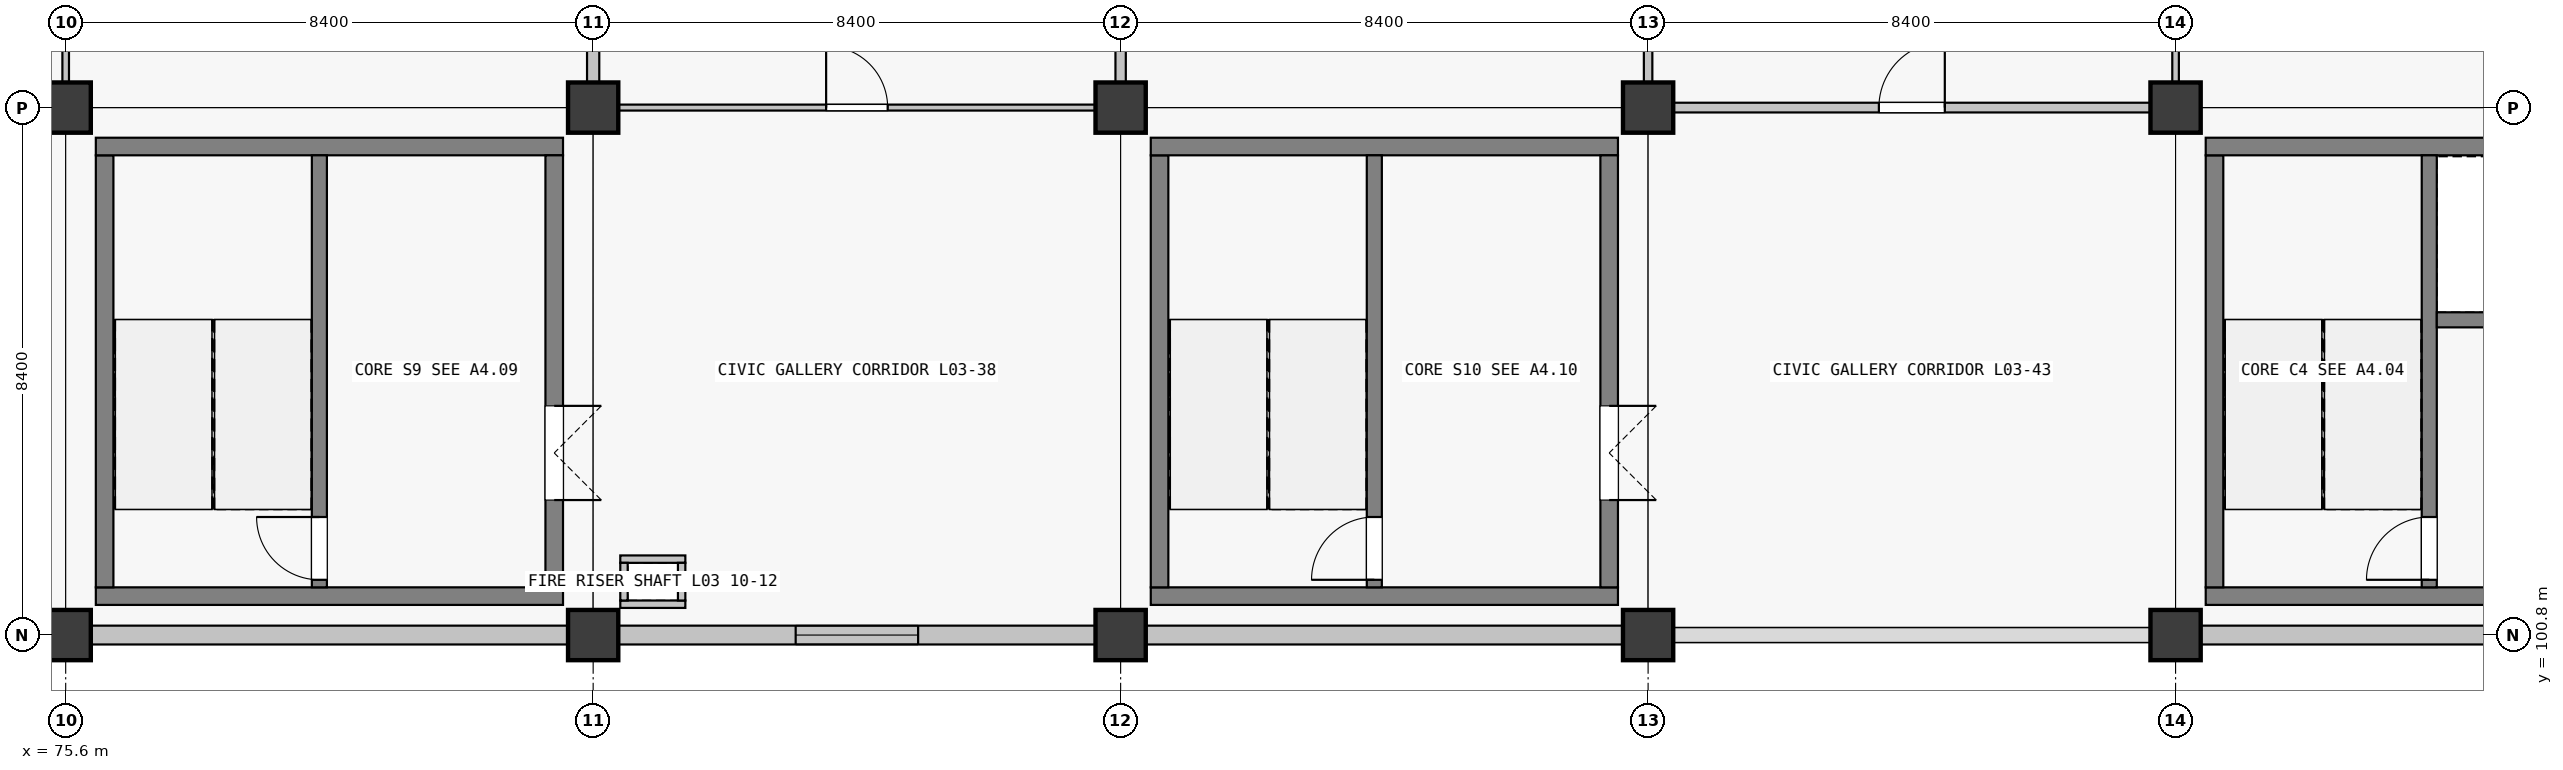
"""IFC4 building model, lengths in metres.
Left out: names, types, materials, properties, quantities, classifications, styles, units other than length and angle.
Written with IfcOpenShell. Run it as: python <this file> out.ifc"""

import sys

from ifc_helpers import new_model, si_unit, direction, frame, frame_2d, origin, origin_2d, place, context, subcontext, project, spatial, rectangle, extrude, element, fill, save


model = new_model("IFC4")
c1 = context("Model", 3, precision=1e-05, world=origin(), true_north=direction((0.0, 1.0)))
c2 = subcontext(c1, "Body", "Model", "MODEL_VIEW")
j1 = project(units=[si_unit("LENGTHUNIT", "METRE"), si_unit("PLANEANGLEUNIT", "RADIAN")], contexts=[c1])
p1 = place(None, origin())
s1 = spatial("IfcSite", under=j1, at=p1, CompositionType="ELEMENT")
p2 = place(p1, origin())
s2 = spatial("IfcBuilding", under=s1, at=p2, CompositionType="ELEMENT")
p3 = place(p2, frame((0.0, 0.0, 14.76)))
s3 = spatial("IfcBuildingStorey", under=s2, at=p3, CompositionType="ELEMENT", Elevation=14.76)
for number, where, z_axis, x_axis in (
    (1, (75.6, 100.8, 0.0), (0.0, 0.0, 1.0), (1.0, 0.0, 0.0)),
    (2, (75.6, 109.2, 0.0), (0.0, 0.0, 1.0), (1.0, 0.0, 0.0)),
    (3, (84.0, 100.8, 0.0), (0.0, 0.0, 1.0), (1.0, 0.0, 0.0)),
    (4, (84.0, 109.2, 0.0), (0.0, 0.0, 1.0), (1.0, 0.0, 0.0)),
    (5, (92.4, 100.8, 0.0), (0.0, 0.0, 1.0), (1.0, 0.0, 0.0)),
    (6, (92.4, 109.2, 0.0), (0.0, 0.0, 1.0), (1.0, 0.0, 0.0)),
    (7, (100.8, 100.8, 0.0), (0.0, 0.0, 1.0), (1.0, 0.0, 0.0)),
    (8, (100.8, 109.2, 0.0), (0.0, 0.0, 1.0), (1.0, 0.0, 0.0)),
    (9, (109.2, 100.8, 0.0), (0.0, 0.0, 1.0), (1.0, 0.0, 0.0)),
    (10, (109.2, 109.2, 0.0), (0.0, 0.0, 1.0), (1.0, 0.0, 0.0)),
):
    element("IfcColumn", number, at=place(p3, frame(where, z_axis=z_axis, x_axis=x_axis)), inside=s3, PredefinedType="COLUMN", context=c2, shape_type="SweptSolid", body=[
        extrude(rectangle(XDim=0.8, YDim=0.8, at=origin_2d()), origin(), (0.0, 0.0, 1.0), 4.32),
    ])
p4 = place(p3, frame((83.599, 100.8, 0.0), z_axis=(0.0, 0.0, 1.0), x_axis=(-1.0, 0.0, 0.0)))
e11 = element("IfcWall", 11, at=p4, inside=s3, PredefinedType="SOLIDWALL", context=c2, shape_type="SweptSolid", body=[
    extrude(rectangle(XDim=7.598, YDim=0.3, at=frame_2d((3.799, 0.0))), origin(), (0.0, 0.0, 1.0), 3.37),
])
p5 = place(p3, frame((91.999, 100.8, 0.0), z_axis=(0.0, 0.0, 1.0), x_axis=(-1.0, 0.0, 0.0)))
e12 = element("IfcWall", 12, at=p5, inside=s3, PredefinedType="SOLIDWALL", context=c2, shape_type="SweptSolid", body=[
    extrude(rectangle(XDim=7.598, YDim=0.3, at=frame_2d((3.799, 0.0))), origin(), (0.0, 0.0, 1.0), 3.37),
])
p6 = place(p5, frame((2.824, 0.0, 0.9)))
e13 = element("IfcOpeningElement", 13, at=p6, cuts=e12, PredefinedType="OPENING", context=c2, shape_type="SweptSolid", body=[
    extrude(rectangle(XDim=1.95, YDim=1.6, at=frame_2d((0.975, 0.8))), frame((0.0, 0.15, 0.0), z_axis=(0.0, -1.0, 0.0), x_axis=(1.0, 0.0, 0.0)), (0.0, 0.0, 1.0), 0.3),
])
for number, where, z_axis, x_axis in (
    (14, (100.399, 100.8, 0.0), (0.0, 0.0, 1.0), (-1.0, 0.0, 0.0)),
    (15, (117.199, 100.8, 0.0), (0.0, 0.0, 1.0), (-1.0, 0.0, 0.0)),
):
    element("IfcWall", number, at=place(p3, frame(where, z_axis=z_axis, x_axis=x_axis)), inside=s3, PredefinedType="SOLIDWALL", context=c2, shape_type="SweptSolid", body=[
        extrude(rectangle(XDim=7.598, YDim=0.3, at=frame_2d((3.799, 0.0))), origin(), (0.0, 0.0, 1.0), 3.37),
    ])
p7 = place(p3, frame((117.12, 101.42, 0.0), z_axis=(0.0, 0.0, 1.0), x_axis=(-1.0, 0.0, 0.0)))
e16 = element("IfcWall", 16, at=p7, inside=s3, PredefinedType="SHEAR", context=c2, shape_type="SweptSolid", body=[
    extrude(rectangle(XDim=7.44, YDim=0.28, at=frame_2d((3.72, 0.0))), origin(), (0.0, 0.0, 1.0), 4.32),
])
p8 = place(p3, frame((109.82, 101.56, 0.0), z_axis=(0.0, 0.0, 1.0), x_axis=(0.0, 1.0, 0.0)))
e17 = element("IfcWall", 17, at=p8, inside=s3, PredefinedType="SHEAR", context=c2, shape_type="SweptSolid", body=[
    extrude(rectangle(XDim=6.88, YDim=0.28, at=frame_2d((3.44, 0.0))), origin(), (0.0, 0.0, 1.0), 4.32),
])
p9 = place(p3, frame((109.68, 108.58, 0.0), z_axis=(0.0, 0.0, 1.0), x_axis=(1.0, 0.0, 0.0)))
e18 = element("IfcWall", 18, at=p9, inside=s3, PredefinedType="SHEAR", context=c2, shape_type="SweptSolid", body=[
    extrude(rectangle(XDim=7.44, YDim=0.28, at=frame_2d((3.72, 0.0))), origin(), (0.0, 0.0, 1.0), 4.32),
])
p10 = place(p3, frame((113.24, 101.56, 0.0), z_axis=(0.0, 0.0, 1.0), x_axis=(0.0, 1.0, 0.0)))
e19 = element("IfcWall", 19, at=p10, inside=s3, PredefinedType="SHEAR", context=c2, shape_type="SweptSolid", body=[
    extrude(rectangle(XDim=6.88, YDim=0.24, at=frame_2d((3.44, 0.0))), origin(), (0.0, 0.0, 1.0), 4.32),
])
p11 = place(p10, frame((0.12, 0.0, 0.0)))
e20 = element("IfcOpeningElement", 20, at=p11, cuts=e19, PredefinedType="OPENING", context=c2, shape_type="SweptSolid", body=[
    extrude(rectangle(XDim=1.0, YDim=2.15, at=frame_2d((0.5, 1.075))), frame((0.0, 0.12, 0.0), z_axis=(0.0, -1.0, 0.0), x_axis=(1.0, 0.0, 0.0)), (0.0, 0.0, 1.0), 0.24),
])
p12 = place(p3, frame((113.36, 105.82, 0.0), z_axis=(0.0, 0.0, 1.0), x_axis=(1.0, 0.0, 0.0)))
e21 = element("IfcWall", 21, at=p12, inside=s3, PredefinedType="SHEAR", context=c2, shape_type="SweptSolid", body=[
    extrude(rectangle(XDim=3.48, YDim=0.24, at=frame_2d((1.74, 0.0))), origin(), (0.0, 0.0, 1.0), 4.32),
])
p13 = place(p12, frame((1.14, 0.0, 0.0)))
e22 = element("IfcOpeningElement", 22, at=p13, cuts=e21, PredefinedType="OPENING", context=c2, shape_type="SweptSolid", body=[
    extrude(rectangle(XDim=1.2, YDim=2.2, at=frame_2d((0.6, 1.1))), frame((0.0, 0.12, 0.0), z_axis=(0.0, -1.0, 0.0), x_axis=(1.0, 0.0, 0.0)), (0.0, 0.0, 1.0), 0.24),
])
p14 = place(p3, frame((83.52, 101.42, 0.0), z_axis=(0.0, 0.0, 1.0), x_axis=(-1.0, 0.0, 0.0)))
e23 = element("IfcWall", 23, at=p14, inside=s3, PredefinedType="SHEAR", context=c2, shape_type="SweptSolid", body=[
    extrude(rectangle(XDim=7.44, YDim=0.28, at=frame_2d((3.72, 0.0))), origin(), (0.0, 0.0, 1.0), 4.32),
])
p15 = place(p3, frame((76.22, 101.56, 0.0), z_axis=(0.0, 0.0, 1.0), x_axis=(0.0, 1.0, 0.0)))
e24 = element("IfcWall", 24, at=p15, inside=s3, PredefinedType="SHEAR", context=c2, shape_type="SweptSolid", body=[
    extrude(rectangle(XDim=6.88, YDim=0.28, at=frame_2d((3.44, 0.0))), origin(), (0.0, 0.0, 1.0), 4.32),
])
p16 = place(p3, frame((76.08, 108.58, 0.0), z_axis=(0.0, 0.0, 1.0), x_axis=(1.0, 0.0, 0.0)))
e25 = element("IfcWall", 25, at=p16, inside=s3, PredefinedType="SHEAR", context=c2, shape_type="SweptSolid", body=[
    extrude(rectangle(XDim=7.44, YDim=0.28, at=frame_2d((3.72, 0.0))), origin(), (0.0, 0.0, 1.0), 4.32),
])
p17 = place(p3, frame((83.38, 108.44, 0.0), z_axis=(0.0, 0.0, 1.0), x_axis=(0.0, -1.0, 0.0)))
e26 = element("IfcWall", 26, at=p17, inside=s3, PredefinedType="SHEAR", context=c2, shape_type="SweptSolid", body=[
    extrude(rectangle(XDim=6.88, YDim=0.28, at=frame_2d((3.44, 0.0))), origin(), (0.0, 0.0, 1.0), 4.32),
])
p18 = place(p17, frame((3.99, 0.0, 0.0)))
e27 = element("IfcOpeningElement", 27, at=p18, cuts=e26, PredefinedType="OPENING", context=c2, shape_type="SweptSolid", body=[
    extrude(rectangle(XDim=1.5, YDim=2.15, at=frame_2d((0.75, 1.075))), frame((0.0, 0.14, 0.0), z_axis=(0.0, -1.0, 0.0), x_axis=(1.0, 0.0, 0.0)), (0.0, 0.0, 1.0), 0.28),
])
p19 = place(p3, frame((79.64, 101.56, 0.0), z_axis=(0.0, 0.0, 1.0), x_axis=(0.0, 1.0, 0.0)))
e28 = element("IfcWall", 28, at=p19, inside=s3, PredefinedType="SHEAR", context=c2, shape_type="SweptSolid", body=[
    extrude(rectangle(XDim=6.88, YDim=0.24, at=frame_2d((3.44, 0.0))), origin(), (0.0, 0.0, 1.0), 4.32),
])
p20 = place(p19, frame((0.12, 0.0, 0.0)))
e29 = element("IfcOpeningElement", 29, at=p20, cuts=e28, PredefinedType="OPENING", context=c2, shape_type="SweptSolid", body=[
    extrude(rectangle(XDim=1.0, YDim=2.15, at=frame_2d((0.5, 1.075))), frame((0.0, 0.12, 0.0), z_axis=(0.0, -1.0, 0.0), x_axis=(1.0, 0.0, 0.0)), (0.0, 0.0, 1.0), 0.24),
])
p21 = place(p3, frame((100.32, 101.42, 0.0), z_axis=(0.0, 0.0, 1.0), x_axis=(-1.0, 0.0, 0.0)))
e30 = element("IfcWall", 30, at=p21, inside=s3, PredefinedType="SHEAR", context=c2, shape_type="SweptSolid", body=[
    extrude(rectangle(XDim=7.44, YDim=0.28, at=frame_2d((3.72, 0.0))), origin(), (0.0, 0.0, 1.0), 4.32),
])
p22 = place(p3, frame((93.02, 101.56, 0.0), z_axis=(0.0, 0.0, 1.0), x_axis=(0.0, 1.0, 0.0)))
e31 = element("IfcWall", 31, at=p22, inside=s3, PredefinedType="SHEAR", context=c2, shape_type="SweptSolid", body=[
    extrude(rectangle(XDim=6.88, YDim=0.28, at=frame_2d((3.44, 0.0))), origin(), (0.0, 0.0, 1.0), 4.32),
])
p23 = place(p3, frame((92.88, 108.58, 0.0), z_axis=(0.0, 0.0, 1.0), x_axis=(1.0, 0.0, 0.0)))
e32 = element("IfcWall", 32, at=p23, inside=s3, PredefinedType="SHEAR", context=c2, shape_type="SweptSolid", body=[
    extrude(rectangle(XDim=7.44, YDim=0.28, at=frame_2d((3.72, 0.0))), origin(), (0.0, 0.0, 1.0), 4.32),
])
p24 = place(p3, frame((100.18, 108.44, 0.0), z_axis=(0.0, 0.0, 1.0), x_axis=(0.0, -1.0, 0.0)))
e33 = element("IfcWall", 33, at=p24, inside=s3, PredefinedType="SHEAR", context=c2, shape_type="SweptSolid", body=[
    extrude(rectangle(XDim=6.88, YDim=0.28, at=frame_2d((3.44, 0.0))), origin(), (0.0, 0.0, 1.0), 4.32),
])
p25 = place(p24, frame((3.99, 0.0, 0.0)))
e34 = element("IfcOpeningElement", 34, at=p25, cuts=e33, PredefinedType="OPENING", context=c2, shape_type="SweptSolid", body=[
    extrude(rectangle(XDim=1.5, YDim=2.15, at=frame_2d((0.75, 1.075))), frame((0.0, 0.14, 0.0), z_axis=(0.0, -1.0, 0.0), x_axis=(1.0, 0.0, 0.0)), (0.0, 0.0, 1.0), 0.28),
])
p26 = place(p3, frame((96.44, 101.56, 0.0), z_axis=(0.0, 0.0, 1.0), x_axis=(0.0, 1.0, 0.0)))
e35 = element("IfcWall", 35, at=p26, inside=s3, PredefinedType="SHEAR", context=c2, shape_type="SweptSolid", body=[
    extrude(rectangle(XDim=6.88, YDim=0.24, at=frame_2d((3.44, 0.0))), origin(), (0.0, 0.0, 1.0), 4.32),
])
p27 = place(p26, frame((0.12, 0.0, 0.0)))
e36 = element("IfcOpeningElement", 36, at=p27, cuts=e35, PredefinedType="OPENING", context=c2, shape_type="SweptSolid", body=[
    extrude(rectangle(XDim=1.0, YDim=2.15, at=frame_2d((0.5, 1.075))), frame((0.0, 0.12, 0.0), z_axis=(0.0, -1.0, 0.0), x_axis=(1.0, 0.0, 0.0)), (0.0, 0.0, 1.0), 0.24),
])
for number, where, z_axis, x_axis in (
    (37, (84.432, 101.291, 0.0), (0.0, 0.0, 1.0), (1.0, 0.0, 0.0)),
    (38, (84.432, 102.009, 0.0), (0.0, 0.0, 1.0), (1.0, 0.0, 0.0)),
):
    element("IfcWall", number, at=place(p3, frame(where, z_axis=z_axis, x_axis=x_axis)), inside=s3, PredefinedType="PARTITIONING", context=c2, shape_type="SweptSolid", body=[
        extrude(rectangle(XDim=1.036, YDim=0.118, at=frame_2d((0.518, 0.0))), origin(), (0.0, 0.0, 1.0), 3.35),
    ])
for number, where, z_axis, x_axis in (
    (39, (84.491, 101.35, 0.0), (0.0, 0.0, 1.0), (0.0, 1.0, 0.0)),
    (40, (85.409, 101.35, 0.0), (0.0, 0.0, 1.0), (0.0, 1.0, 0.0)),
):
    element("IfcWall", number, at=place(p3, frame(where, z_axis=z_axis, x_axis=x_axis)), inside=s3, PredefinedType="PARTITIONING", context=c2, shape_type="SweptSolid", body=[
        extrude(rectangle(XDim=0.6, YDim=0.118, at=frame_2d((0.3, 0.0))), origin(), (0.0, 0.0, 1.0), 3.35),
    ])
p28 = place(p3, frame((84.402, 109.2, 0.0), z_axis=(0.0, 0.0, 1.0), x_axis=(1.0, 0.0, 0.0)))
e41 = element("IfcWall", 41, at=p28, inside=s3, PredefinedType="PARTITIONING", context=c2, shape_type="SweptSolid", body=[
    extrude(rectangle(XDim=7.596, YDim=0.095, at=frame_2d((3.798, 0.0))), origin(), (0.0, 0.0, 1.0), 3.19),
])
p29 = place(p28, frame((3.308, 0.0, 0.0)))
e42 = element("IfcOpeningElement", 42, at=p29, cuts=e41, PredefinedType="OPENING", context=c2, shape_type="SweptSolid", body=[
    extrude(rectangle(XDim=0.98, YDim=2.18, at=frame_2d((0.49, 1.09))), frame((0.0, 0.047, 0.0), z_axis=(0.0, -1.0, 0.0), x_axis=(1.0, 0.0, 0.0)), (0.0, 0.0, 1.0), 0.095),
])
p30 = place(p3, frame((101.202, 109.2, 0.0), z_axis=(0.0, 0.0, 1.0), x_axis=(1.0, 0.0, 0.0)))
e43 = element("IfcWall", 43, at=p30, inside=s3, PredefinedType="PARTITIONING", context=c2, shape_type="SweptSolid", body=[
    extrude(rectangle(XDim=7.596, YDim=0.155, at=frame_2d((3.798, 0.0))), origin(), (0.0, 0.0, 1.0), 3.19),
])
p31 = place(p30, frame((3.273, 0.0, 0.0)))
e44 = element("IfcOpeningElement", 44, at=p31, cuts=e43, PredefinedType="OPENING", context=c2, shape_type="SweptSolid", body=[
    extrude(rectangle(XDim=1.05, YDim=2.12, at=frame_2d((0.525, 1.06))), frame((0.0, 0.078, 0.0), z_axis=(0.0, -1.0, 0.0), x_axis=(1.0, 0.0, 0.0)), (0.0, 0.0, 1.0), 0.155),
])
p32 = place(p3, frame((75.6, 109.602, 0.0), z_axis=(0.0, 0.0, 1.0), x_axis=(0.0, 1.0, 0.0)))
e45 = element("IfcWall", 45, at=p32, inside=s3, PredefinedType="PARTITIONING", context=c2, shape_type="SweptSolid", body=[
    extrude(rectangle(XDim=7.646, YDim=0.105, at=frame_2d((3.823, 0.0))), origin(), (0.0, 0.0, 1.0), 3.19),
])
p33 = place(p3, frame((84.0, 109.602, 0.0), z_axis=(0.0, 0.0, 1.0), x_axis=(0.0, 1.0, 0.0)))
e46 = element("IfcWall", 46, at=p33, inside=s3, PredefinedType="PARTITIONING", context=c2, shape_type="SweptSolid", body=[
    extrude(rectangle(XDim=7.621, YDim=0.195, at=frame_2d((3.811, 0.0))), origin(), (0.0, 0.0, 1.0), 3.19),
])
p34 = place(p33, frame((3.301, 0.0, 0.0)))
e47 = element("IfcOpeningElement", 47, at=p34, cuts=e46, PredefinedType="OPENING", context=c2, shape_type="SweptSolid", body=[
    extrude(rectangle(XDim=1.02, YDim=2.2, at=frame_2d((0.51, 1.1))), frame((0.0, 0.098, 0.0), z_axis=(0.0, -1.0, 0.0), x_axis=(1.0, 0.0, 0.0)), (0.0, 0.0, 1.0), 0.195),
])
p35 = place(p3, frame((92.4, 109.602, 0.0), z_axis=(0.0, 0.0, 1.0), x_axis=(0.0, 1.0, 0.0)))
e48 = element("IfcWall", 48, at=p35, inside=s3, PredefinedType="PARTITIONING", context=c2, shape_type="SweptSolid", body=[
    extrude(rectangle(XDim=7.646, YDim=0.165, at=frame_2d((3.823, 0.0))), origin(), (0.0, 0.0, 1.0), 3.19),
])
p36 = place(p35, frame((3.323, 0.0, 0.0)))
e49 = element("IfcOpeningElement", 49, at=p36, cuts=e48, PredefinedType="OPENING", context=c2, shape_type="SweptSolid", body=[
    extrude(rectangle(XDim=1.0, YDim=2.2, at=frame_2d((0.5, 1.1))), frame((0.0, 0.083, 0.0), z_axis=(0.0, -1.0, 0.0), x_axis=(1.0, 0.0, 0.0)), (0.0, 0.0, 1.0), 0.165),
])
p37 = place(p3, frame((100.8, 109.602, 0.0), z_axis=(0.0, 0.0, 1.0), x_axis=(0.0, 1.0, 0.0)))
e50 = element("IfcWall", 50, at=p37, inside=s3, PredefinedType="PARTITIONING", context=c2, shape_type="SweptSolid", body=[
    extrude(rectangle(XDim=7.621, YDim=0.135, at=frame_2d((3.811, 0.0))), origin(), (0.0, 0.0, 1.0), 3.19),
])
p38 = place(p37, frame((3.291, 0.0, 0.0)))
e51 = element("IfcOpeningElement", 51, at=p38, cuts=e50, PredefinedType="OPENING", context=c2, shape_type="SweptSolid", body=[
    extrude(rectangle(XDim=1.04, YDim=2.2, at=frame_2d((0.52, 1.1))), frame((0.0, 0.067, 0.0), z_axis=(0.0, -1.0, 0.0), x_axis=(1.0, 0.0, 0.0)), (0.0, 0.0, 1.0), 0.135),
])
p39 = place(p3, frame((109.2, 109.602, 0.0), z_axis=(0.0, 0.0, 1.0), x_axis=(0.0, 1.0, 0.0)))
e52 = element("IfcWall", 52, at=p39, inside=s3, PredefinedType="PARTITIONING", context=c2, shape_type="SweptSolid", body=[
    extrude(rectangle(XDim=7.646, YDim=0.105, at=frame_2d((3.823, 0.0))), origin(), (0.0, 0.0, 1.0), 3.19),
])
p40 = place(p39, frame((3.333, 0.0, 0.0)))
e53 = element("IfcOpeningElement", 53, at=p40, cuts=e52, PredefinedType="OPENING", context=c2, shape_type="SweptSolid", body=[
    extrude(rectangle(XDim=0.98, YDim=2.18, at=frame_2d((0.49, 1.09))), frame((0.0, 0.052, 0.0), z_axis=(0.0, -1.0, 0.0), x_axis=(1.0, 0.0, 0.0)), (0.0, 0.0, 1.0), 0.105),
])
p41 = place(p6, origin())
e54 = element("IfcWindow", 54, at=p41, inside=s3, PartitioningType="SINGLE_PANEL", PredefinedType="WINDOW", context=c2, shape_type="SweptSolid", body=[
    extrude(rectangle(XDim=1.95, YDim=1.6, at=frame_2d((0.975, 0.8))), frame((0.0, 0.03, 0.0), z_axis=(0.0, -1.0, 0.0), x_axis=(1.0, 0.0, 0.0)), (0.0, 0.0, 1.0), 0.06),
])
fill(e13, e54)
p42 = place(p11, origin())
e55 = element("IfcDoor", 55, at=p42, inside=s3, OperationType="SINGLE_SWING_LEFT", PredefinedType="DOOR", context=c2, shape_type="SweptSolid", body=[
    extrude(rectangle(XDim=1.0, YDim=2.15, at=frame_2d((0.5, 1.075))), frame((0.0, 0.025, 0.0), z_axis=(0.0, -1.0, 0.0), x_axis=(1.0, 0.0, 0.0)), (0.0, 0.0, 1.0), 0.05),
])
fill(e20, e55)
p43 = place(p20, origin())
e56 = element("IfcDoor", 56, at=p43, inside=s3, OperationType="SINGLE_SWING_RIGHT", PredefinedType="DOOR", context=c2, shape_type="SweptSolid", body=[
    extrude(rectangle(XDim=1.0, YDim=2.15, at=frame_2d((0.5, 1.075))), frame((0.0, 0.025, 0.0), z_axis=(0.0, -1.0, 0.0), x_axis=(1.0, 0.0, 0.0)), (0.0, 0.0, 1.0), 0.05),
])
fill(e29, e56)
p44 = place(p18, origin())
e57 = element("IfcDoor", 57, at=p44, inside=s3, OperationType="DOUBLE_DOOR_SINGLE_SWING", PredefinedType="DOOR", context=c2, shape_type="SweptSolid", body=[
    extrude(rectangle(XDim=1.5, YDim=2.15, at=frame_2d((0.75, 1.075))), frame((0.0, 0.025, 0.0), z_axis=(0.0, -1.0, 0.0), x_axis=(1.0, 0.0, 0.0)), (0.0, 0.0, 1.0), 0.05),
])
fill(e27, e57)
p45 = place(p27, origin())
e58 = element("IfcDoor", 58, at=p45, inside=s3, OperationType="SINGLE_SWING_LEFT", PredefinedType="DOOR", context=c2, shape_type="SweptSolid", body=[
    extrude(rectangle(XDim=1.0, YDim=2.15, at=frame_2d((0.5, 1.075))), frame((0.0, 0.025, 0.0), z_axis=(0.0, -1.0, 0.0), x_axis=(1.0, 0.0, 0.0)), (0.0, 0.0, 1.0), 0.05),
])
fill(e36, e58)
p46 = place(p25, origin())
e59 = element("IfcDoor", 59, at=p46, inside=s3, OperationType="DOUBLE_DOOR_SINGLE_SWING", PredefinedType="DOOR", context=c2, shape_type="SweptSolid", body=[
    extrude(rectangle(XDim=1.5, YDim=2.15, at=frame_2d((0.75, 1.075))), frame((0.0, 0.025, 0.0), z_axis=(0.0, -1.0, 0.0), x_axis=(1.0, 0.0, 0.0)), (0.0, 0.0, 1.0), 0.05),
])
fill(e34, e59)
p47 = place(p29, origin())
e60 = element("IfcDoor", 60, at=p47, inside=s3, OperationType="SINGLE_SWING_LEFT", PredefinedType="DOOR", context=c2, shape_type="SweptSolid", body=[
    extrude(rectangle(XDim=0.98, YDim=2.18, at=frame_2d((0.49, 1.09))), frame((0.0, 0.025, 0.0), z_axis=(0.0, -1.0, 0.0), x_axis=(1.0, 0.0, 0.0)), (0.0, 0.0, 1.0), 0.05),
])
fill(e42, e60)
p48 = place(p31, origin())
e61 = element("IfcDoor", 61, at=p48, inside=s3, OperationType="SINGLE_SWING_RIGHT", PredefinedType="DOOR", context=c2, shape_type="SweptSolid", body=[
    extrude(rectangle(XDim=1.05, YDim=2.12, at=frame_2d((0.525, 1.06))), frame((0.0, 0.025, 0.0), z_axis=(0.0, -1.0, 0.0), x_axis=(1.0, 0.0, 0.0)), (0.0, 0.0, 1.0), 0.05),
])
fill(e44, e61)
save(model, sys.argv[1])
